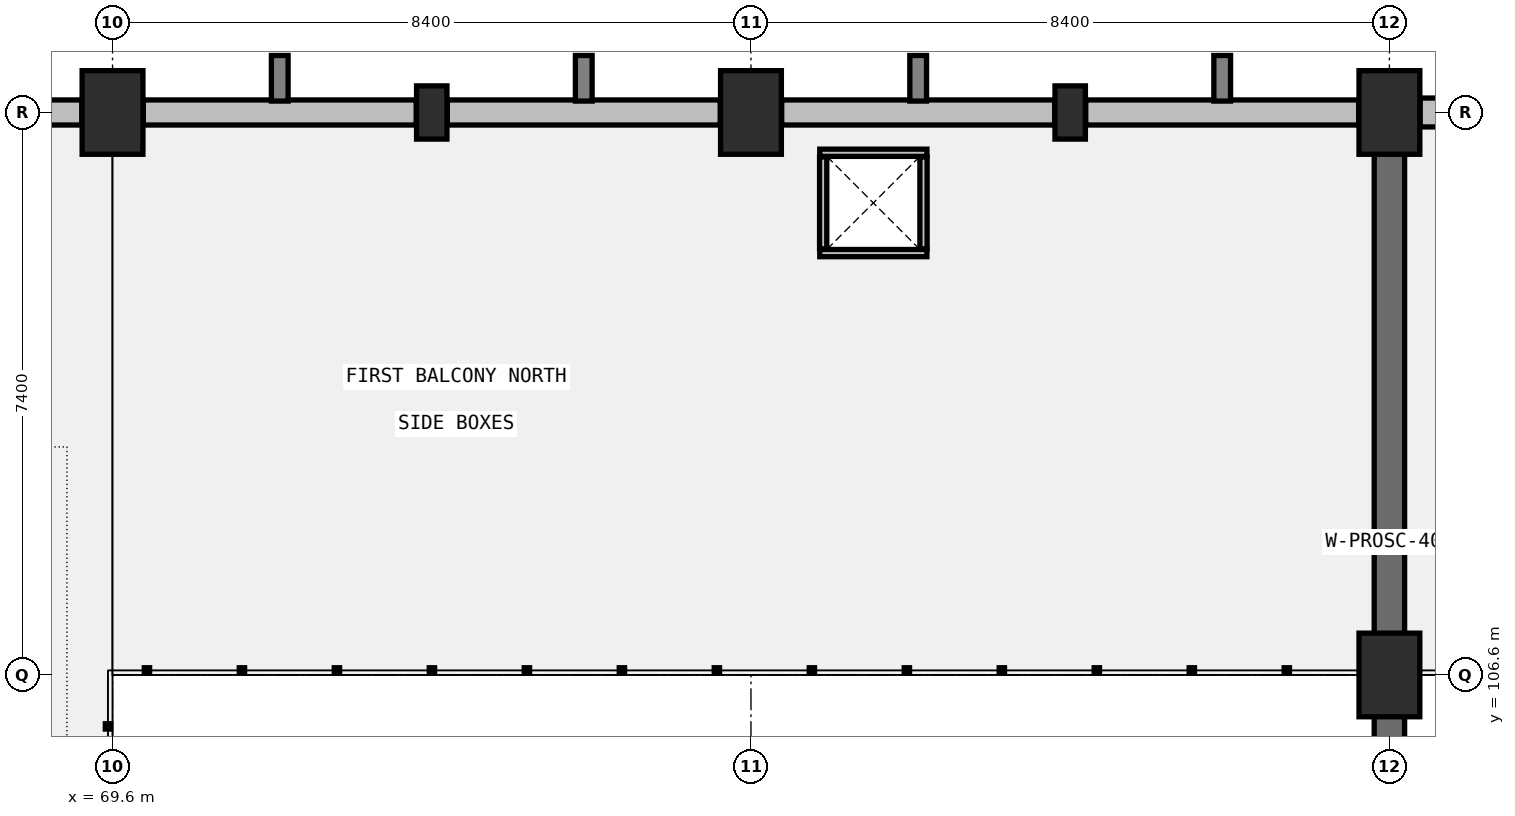
"""IFC4 building model, lengths in metres.
Left out: names, types, materials, properties, quantities, classifications, styles, units other than length and angle.
Written with IfcOpenShell. Run it as: python <this file> out.ifc"""

import sys

from ifc_helpers import new_model, si_unit, direction, frame, frame_2d, origin, origin_2d, place, context, subcontext, project, spatial, rectangle, extrude, element, save


model = new_model("IFC4")
c1 = context("Model", 3, precision=1e-05, world=origin(), true_north=direction((0.0, 1.0)))
c2 = subcontext(c1, "Body", "Model", "MODEL_VIEW")
j1 = project(units=[si_unit("LENGTHUNIT", "METRE"), si_unit("PLANEANGLEUNIT", "RADIAN")], contexts=[c1])
p1 = place(None, origin())
s1 = spatial("IfcSite", under=j1, at=p1, CompositionType="ELEMENT")
p2 = place(p1, origin())
s2 = spatial("IfcBuilding", under=s1, at=p2, CompositionType="ELEMENT")
p3 = place(p2, frame((0.0, 0.0, 5.4)))
s3 = spatial("IfcBuildingStorey", under=s2, at=p3, CompositionType="ELEMENT", Elevation=5.4)
p4 = place(p3, frame((69.6, 114.0, 0.0), z_axis=(0.0, 0.0, 1.0), x_axis=(1.0, 0.0, 0.0)))
e1 = element("IfcColumn", 1, at=p4, inside=s3, PredefinedType="COLUMN", context=c2, shape_type="SweptSolid", body=[
    extrude(rectangle(XDim=0.8, YDim=1.1, at=origin_2d()), origin(), (0.0, 0.0, 1.0), 4.6),
])
p5 = place(p3, frame((73.8, 114.0, 0.0), z_axis=(0.0, 0.0, 1.0), x_axis=(1.0, 0.0, 0.0)))
e2 = element("IfcColumn", 2, at=p5, inside=s3, PredefinedType="PILASTER", context=c2, shape_type="SweptSolid", body=[
    extrude(rectangle(XDim=0.4, YDim=0.7, at=origin_2d()), origin(), (0.0, 0.0, 1.0), 4.6),
])
p6 = place(p3, frame((78.0, 114.0, 0.0), z_axis=(0.0, 0.0, 1.0), x_axis=(1.0, 0.0, 0.0)))
e3 = element("IfcColumn", 3, at=p6, inside=s3, PredefinedType="COLUMN", context=c2, shape_type="SweptSolid", body=[
    extrude(rectangle(XDim=0.8, YDim=1.1, at=origin_2d()), origin(), (0.0, 0.0, 1.0), 4.6),
])
p7 = place(p3, frame((82.2, 114.0, 0.0), z_axis=(0.0, 0.0, 1.0), x_axis=(1.0, 0.0, 0.0)))
e4 = element("IfcColumn", 4, at=p7, inside=s3, PredefinedType="PILASTER", context=c2, shape_type="SweptSolid", body=[
    extrude(rectangle(XDim=0.4, YDim=0.7, at=origin_2d()), origin(), (0.0, 0.0, 1.0), 4.6),
])
for number, where, z_axis, x_axis in (
    (5, (86.4, 106.6, 0.0), (0.0, 0.0, 1.0), (1.0, 0.0, 0.0)),
    (6, (86.4, 114.0, 0.0), (0.0, 0.0, 1.0), (1.0, 0.0, 0.0)),
):
    element("IfcColumn", number, at=place(p3, frame(where, z_axis=z_axis, x_axis=x_axis)), inside=s3, PredefinedType="COLUMN", context=c2, shape_type="SweptSolid", body=[
        extrude(rectangle(XDim=0.8, YDim=1.1, at=origin_2d()), origin(), (0.0, 0.0, 1.0), 4.6),
    ])
p8 = place(p3, frame((86.4, 103.2, 0.0), z_axis=(0.0, 0.0, 1.0), x_axis=(0.0, 1.0, 0.0)))
e7 = element("IfcWall", 7, at=p8, inside=s3, PredefinedType="SHEAR", context=c2, shape_type="SweptSolid", body=[
    extrude(rectangle(XDim=10.3, YDim=0.4, at=frame_2d((5.15, 0.0))), origin(), (0.0, 0.0, 1.0), 4.36),
])
for number, where, z_axis, x_axis in (
    (8, (65.604, 114.0, 0.0), (0.0, 0.0, 1.0), (1.0, 0.0, 0.0)),
    (9, (70.004, 114.0, 0.0), (0.0, 0.0, 1.0), (1.0, 0.0, 0.0)),
    (10, (74.004, 114.0, 0.0), (0.0, 0.0, 1.0), (1.0, 0.0, 0.0)),
    (11, (78.404, 114.0, 0.0), (0.0, 0.0, 1.0), (1.0, 0.0, 0.0)),
    (12, (82.404, 114.0, 0.0), (0.0, 0.0, 1.0), (1.0, 0.0, 0.0)),
):
    element("IfcWall", number, at=place(p3, frame(where, z_axis=z_axis, x_axis=x_axis)), inside=s3, PredefinedType="STANDARD", context=c2, shape_type="SweptSolid", body=[
        extrude(rectangle(XDim=3.592, YDim=0.33, at=frame_2d((1.796, 0.0))), origin(), (0.0, 0.0, 1.0), 3.628),
    ])
p9 = place(p3, frame((86.804, 114.0, 0.0), z_axis=(0.0, 0.0, 1.0), x_axis=(1.0, 0.0, 0.0)))
e13 = element("IfcWall", 13, at=p9, inside=s3, PredefinedType="STANDARD", context=c2, shape_type="SweptSolid", body=[
    extrude(rectangle(XDim=7.942, YDim=0.38, at=frame_2d((3.971, 0.0))), origin(), (0.0, 0.0, 1.0), 3.528),
])
for number, where, z_axis, x_axis in (
    (14, (78.905, 112.15, 0.0), (0.0, 0.0, 1.0), (1.0, 0.0, 0.0)),
    (15, (78.905, 113.47, 0.0), (0.0, 0.0, 1.0), (1.0, 0.0, 0.0)),
):
    element("IfcWall", number, at=place(p3, frame(where, z_axis=z_axis, x_axis=x_axis)), inside=s3, PredefinedType="PARTITIONING", context=c2, shape_type="SweptSolid", body=[
        extrude(rectangle(XDim=1.41, YDim=0.095, at=frame_2d((0.705, 0.0))), origin(), (0.0, 0.0, 1.0), 4.36),
    ])
for number, where, z_axis, x_axis in (
    (16, (78.95, 112.205, 0.0), (0.0, 0.0, 1.0), (0.0, 1.0, 0.0)),
    (17, (80.27, 112.205, 0.0), (0.0, 0.0, 1.0), (0.0, 1.0, 0.0)),
):
    element("IfcWall", number, at=place(p3, frame(where, z_axis=z_axis, x_axis=x_axis)), inside=s3, PredefinedType="PARTITIONING", context=c2, shape_type="SweptSolid", body=[
        extrude(rectangle(XDim=1.21, YDim=0.095, at=frame_2d((0.605, 0.0))), origin(), (0.0, 0.0, 1.0), 4.36),
    ])
save(model, sys.argv[1])
